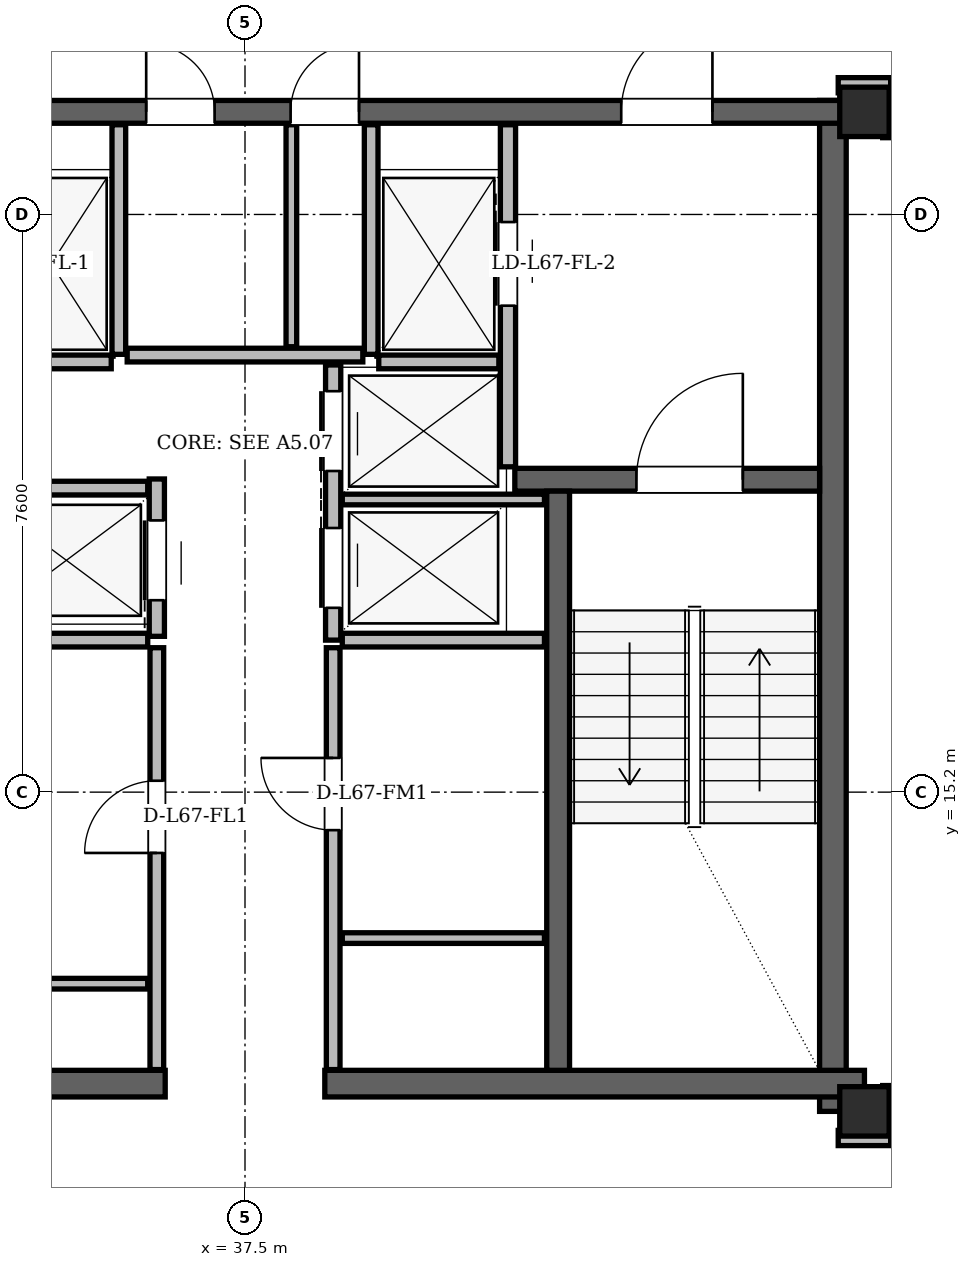
"""IFC4 building model, lengths in metres.
Left out: names, types, materials, properties, quantities, classifications, styles, units other than length and angle.
Written with IfcOpenShell. Run it as: python <this file> out.ifc"""

import sys

from ifc_helpers import new_model, si_unit, direction, frame, frame_2d, origin, origin_2d, place, context, subcontext, project, spatial, rectangle, hollow_rectangle, extrude, element, fill, save


model = new_model("IFC4")
c1 = context("Model", 3, precision=1e-05, world=origin(), true_north=direction((0.0, 1.0)))
c2 = subcontext(c1, "Body", "Model", "MODEL_VIEW")
j1 = project(units=[si_unit("LENGTHUNIT", "METRE"), si_unit("PLANEANGLEUNIT", "RADIAN")], contexts=[c1])
p1 = place(None, origin())
s1 = spatial("IfcSite", under=j1, at=p1, CompositionType="ELEMENT")
p2 = place(p1, origin())
s2 = spatial("IfcBuilding", under=s1, at=p2, CompositionType="ELEMENT")
p3 = place(p2, frame((0.0, 0.0, 253.8)))
s3 = spatial("IfcBuildingStorey", under=s2, at=p3, CompositionType="ELEMENT", Elevation=253.8)
for number, where, z_axis, x_axis in (
    (1, (45.65, 11.0, 0.0), (0.0, 0.0, 1.0), (1.0, 0.0, 0.0)),
    (2, (45.65, 24.15, 0.0), (0.0, 0.0, 1.0), (1.0, 0.0, 0.0)),
):
    element("IfcColumn", number, at=place(p3, frame(where, z_axis=z_axis, x_axis=x_axis)), inside=s3, PredefinedType="COLUMN", context=c2, shape_type="SweptSolid", body=[
        extrude(hollow_rectangle(XDim=0.65, YDim=0.65, WallThickness=0.05, at=origin_2d()), origin(), (0.0, 0.0, 1.0), 3.9),
    ])
p4 = place(p3, frame((45.235, 11.0, 0.0), z_axis=(0.0, 0.0, 1.0), x_axis=(0.0, 1.0, 0.0)))
e3 = element("IfcWall", 3, at=p4, inside=s3, PredefinedType="SHEAR", context=c2, shape_type="SweptSolid", body=[
    extrude(rectangle(XDim=13.3, YDim=0.35, at=frame_2d((6.65, 0.0))), origin(), (0.0, 0.0, 1.0), 3.68),
])
for number, where, z_axis, x_axis in (
    (4, (29.35, 11.365, 0.0), (0.0, 0.0, 1.0), (1.0, 0.0, 0.0)),
    (5, (38.55, 11.365, 0.0), (0.0, 0.0, 1.0), (1.0, 0.0, 0.0)),
):
    element("IfcWall", number, at=place(p3, frame(where, z_axis=z_axis, x_axis=x_axis)), inside=s3, PredefinedType="SHEAR", context=c2, shape_type="SweptSolid", body=[
        extrude(rectangle(XDim=7.1, YDim=0.35, at=frame_2d((3.55, 0.0))), origin(), (0.0, 0.0, 1.0), 3.68),
    ])
p5 = place(p3, frame((29.65, 24.15, 0.0), z_axis=(0.0, 0.0, 1.0), x_axis=(1.0, 0.0, 0.0)))
e6 = element("IfcWall", 6, at=p5, inside=s3, PredefinedType="SHEAR", context=c2, shape_type="SweptSolid", body=[
    extrude(rectangle(XDim=15.7, YDim=0.3, at=frame_2d((7.85, 0.0))), origin(), (0.0, 0.0, 1.0), 3.68),
])
p6 = place(p5, frame((1.7, 0.0, 0.0)))
e7 = element("IfcOpeningElement", 7, at=p6, cuts=e6, PredefinedType="OPENING", context=c2, shape_type="SweptSolid", body=[
    extrude(rectangle(XDim=1.2, YDim=2.2, at=frame_2d((0.6, 1.1))), frame((0.0, 0.15, 0.0), z_axis=(0.0, -1.0, 0.0), x_axis=(1.0, 0.0, 0.0)), (0.0, 0.0, 1.0), 0.3),
])
p7 = place(p5, frame((12.8, 0.0, 0.0)))
e8 = element("IfcOpeningElement", 8, at=p7, cuts=e6, PredefinedType="OPENING", context=c2, shape_type="SweptSolid", body=[
    extrude(rectangle(XDim=1.2, YDim=2.2, at=frame_2d((0.6, 1.1))), frame((0.0, 0.15, 0.0), z_axis=(0.0, -1.0, 0.0), x_axis=(1.0, 0.0, 0.0)), (0.0, 0.0, 1.0), 0.3),
])
p8 = place(p5, frame((6.55, 0.0, 0.0)))
e9 = element("IfcOpeningElement", 9, at=p8, cuts=e6, PredefinedType="OPENING", context=c2, shape_type="SweptSolid", body=[
    extrude(rectangle(XDim=0.9, YDim=2.05, at=frame_2d((0.45, 1.025))), frame((0.0, 0.15, 0.0), z_axis=(0.0, -1.0, 0.0), x_axis=(1.0, 0.0, 0.0)), (0.0, 0.0, 1.0), 0.3),
])
p9 = place(p5, frame((8.45, 0.0, 0.0)))
e10 = element("IfcOpeningElement", 10, at=p9, cuts=e6, PredefinedType="OPENING", context=c2, shape_type="SweptSolid", body=[
    extrude(rectangle(XDim=0.9, YDim=2.05, at=frame_2d((0.45, 1.025))), frame((0.0, 0.15, 0.0), z_axis=(0.0, -1.0, 0.0), x_axis=(1.0, 0.0, 0.0)), (0.0, 0.0, 1.0), 0.3),
])
p10 = place(p3, frame((41.05, 19.31, 0.0), z_axis=(0.0, 0.0, 1.0), x_axis=(1.0, 0.0, 0.0)))
e11 = element("IfcWall", 11, at=p10, inside=s3, PredefinedType="SHEAR", context=c2, shape_type="SweptSolid", body=[
    extrude(rectangle(XDim=4.01, YDim=0.3, at=frame_2d((2.005, 0.0))), origin(), (0.0, 0.0, 1.0), 3.68),
])
p11 = place(p10, frame((1.6, 0.0, 0.0)))
e12 = element("IfcOpeningElement", 12, at=p11, cuts=e11, PredefinedType="OPENING", context=c2, shape_type="SweptSolid", body=[
    extrude(rectangle(XDim=1.4, YDim=2.2, at=frame_2d((0.7, 1.1))), frame((0.0, 0.15, 0.0), z_axis=(0.0, -1.0, 0.0), x_axis=(1.0, 0.0, 0.0)), (0.0, 0.0, 1.0), 0.3),
])
p12 = place(p3, frame((41.62, 11.54, 0.0), z_axis=(0.0, 0.0, 1.0), x_axis=(0.0, 1.0, 0.0)))
e13 = element("IfcWall", 13, at=p12, inside=s3, PredefinedType="SHEAR", context=c2, shape_type="SweptSolid", body=[
    extrude(rectangle(XDim=7.62, YDim=0.3, at=frame_2d((3.81, 0.0))), origin(), (0.0, 0.0, 1.0), 3.68),
])
p13 = place(p3, frame((58.733, 10.938, 0.0), z_axis=(0.0, 0.0, 1.0), x_axis=(-0.500001745664, 0.866024395923, 0.0)))
e14 = element("IfcWall", 14, at=p13, inside=s3, PredefinedType="SOLIDWALL", context=c2, shape_type="SweptSolid", body=[
    extrude(rectangle(XDim=37.102, YDim=0.29, at=frame_2d((18.551, 0.0))), origin(), (0.0, 0.0, 1.0), 3.058),
])
p14 = place(p13, frame((8.034, 0.0, 0.0)))
e15 = element("IfcOpeningElement", 15, at=p14, cuts=e14, PredefinedType="OPENING", context=c2, shape_type="SweptSolid", body=[
    extrude(rectangle(XDim=1.5, YDim=2.2, at=frame_2d((0.75, 1.1))), frame((0.0, 0.145, 0.0), z_axis=(0.0, -1.0, 0.0), x_axis=(1.0, 0.0, 0.0)), (0.0, 0.0, 1.0), 0.29),
])
p15 = place(p13, frame((31.963, 0.0, 0.0)))
e16 = element("IfcOpeningElement", 16, at=p15, cuts=e14, PredefinedType="OPENING", context=c2, shape_type="SweptSolid", body=[
    extrude(rectangle(XDim=1.5, YDim=2.2, at=frame_2d((0.75, 1.1))), frame((0.0, 0.145, 0.0), z_axis=(0.0, -1.0, 0.0), x_axis=(1.0, 0.0, 0.0)), (0.0, 0.0, 1.0), 0.29),
])
p16 = place(p13, frame((12.245, 0.0, 0.85)))
e17 = element("IfcOpeningElement", 17, at=p16, cuts=e14, PredefinedType="OPENING", context=c2, shape_type="SweptSolid", body=[
    extrude(rectangle(XDim=2.6, YDim=1.95, at=frame_2d((1.3, 0.975))), frame((0.0, 0.145, 0.0), z_axis=(0.0, -1.0, 0.0), x_axis=(1.0, 0.0, 0.0)), (0.0, 0.0, 1.0), 0.29),
])
p17 = place(p13, frame((1.081, 0.0, 0.85)))
e18 = element("IfcOpeningElement", 18, at=p17, cuts=e14, PredefinedType="OPENING", context=c2, shape_type="SweptSolid", body=[
    extrude(rectangle(XDim=2.4, YDim=1.9, at=frame_2d((1.2, 0.95))), frame((0.0, 0.145, 0.0), z_axis=(0.0, -1.0, 0.0), x_axis=(1.0, 0.0, 0.0)), (0.0, 0.0, 1.0), 0.29),
])
p18 = place(p13, frame((28.842, 0.0, 0.85)))
e19 = element("IfcOpeningElement", 19, at=p18, cuts=e14, PredefinedType="OPENING", context=c2, shape_type="SweptSolid", body=[
    extrude(rectangle(XDim=1.2, YDim=1.48, at=frame_2d((0.6, 0.74))), frame((0.0, 0.145, 0.0), z_axis=(0.0, -1.0, 0.0), x_axis=(1.0, 0.0, 0.0)), (0.0, 0.0, 1.0), 0.29),
])
p19 = place(p13, frame((34.409, 0.0, 0.85)))
e20 = element("IfcOpeningElement", 20, at=p19, cuts=e14, PredefinedType="OPENING", context=c2, shape_type="SweptSolid", body=[
    extrude(rectangle(XDim=1.2, YDim=1.48, at=frame_2d((0.6, 0.74))), frame((0.0, 0.145, 0.0), z_axis=(0.0, -1.0, 0.0), x_axis=(1.0, 0.0, 0.0)), (0.0, 0.0, 1.0), 0.29),
])
p20 = place(p13, frame((15.882, 0.0, 0.85)))
e21 = element("IfcOpeningElement", 21, at=p20, cuts=e14, PredefinedType="OPENING", context=c2, shape_type="SweptSolid", body=[
    extrude(rectangle(XDim=1.2, YDim=1.48, at=frame_2d((0.6, 0.74))), frame((0.0, 0.145, 0.0), z_axis=(0.0, -1.0, 0.0), x_axis=(1.0, 0.0, 0.0)), (0.0, 0.0, 1.0), 0.29),
])
p21 = place(p13, frame((23.379, 0.0, 0.85)))
e22 = element("IfcOpeningElement", 22, at=p21, cuts=e14, PredefinedType="OPENING", context=c2, shape_type="SweptSolid", body=[
    extrude(rectangle(XDim=1.2, YDim=1.48, at=frame_2d((0.6, 0.74))), frame((0.0, 0.145, 0.0), z_axis=(0.0, -1.0, 0.0), x_axis=(1.0, 0.0, 0.0)), (0.0, 0.0, 1.0), 0.29),
])
p22 = place(p3, frame((35.84, 20.96, 0.0), z_axis=(0.0, 0.0, 1.0), x_axis=(0.0, 1.0, 0.0)))
e23 = element("IfcWall", 23, at=p22, inside=s3, PredefinedType="PARTITIONING", context=c2, shape_type="SweptSolid", body=[
    extrude(rectangle(XDim=3.02, YDim=0.18, at=frame_2d((1.51, 0.0))), origin(), (0.0, 0.0, 1.0), 3.68),
])
p23 = place(p3, frame((34.16, 20.86, 0.0), z_axis=(0.0, 0.0, 1.0), x_axis=(1.0, 0.0, 0.0)))
e24 = element("IfcWall", 24, at=p23, inside=s3, PredefinedType="PARTITIONING", context=c2, shape_type="SweptSolid", body=[
    extrude(rectangle(XDim=1.58, YDim=0.18, at=frame_2d((0.79, 0.0))), origin(), (0.0, 0.0, 1.0), 3.68),
])
p24 = place(p3, frame((40.96, 19.48, 0.0), z_axis=(0.0, 0.0, 1.0), x_axis=(0.0, 1.0, 0.0)))
e25 = element("IfcWall", 25, at=p24, inside=s3, PredefinedType="PARTITIONING", context=c2, shape_type="SweptSolid", body=[
    extrude(rectangle(XDim=4.5, YDim=0.2, at=frame_2d((2.25, 0.0))), origin(), (0.0, 0.0, 1.0), 3.68),
])
p25 = place(p24, frame((2.12, 0.0, 0.0)))
e26 = element("IfcOpeningElement", 26, at=p25, cuts=e25, PredefinedType="OPENING", context=c2, shape_type="SweptSolid", body=[
    extrude(rectangle(XDim=1.1, YDim=2.2, at=frame_2d((0.55, 1.1))), frame((0.0, 0.1, 0.0), z_axis=(0.0, -1.0, 0.0), x_axis=(1.0, 0.0, 0.0)), (0.0, 0.0, 1.0), 0.2),
])
p26 = place(p3, frame((39.16, 20.96, 0.0), z_axis=(0.0, 0.0, 1.0), x_axis=(0.0, 1.0, 0.0)))
e27 = element("IfcWall", 27, at=p26, inside=s3, PredefinedType="PARTITIONING", context=c2, shape_type="SweptSolid", body=[
    extrude(rectangle(XDim=3.02, YDim=0.18, at=frame_2d((1.51, 0.0))), origin(), (0.0, 0.0, 1.0), 3.68),
])
p27 = place(p3, frame((39.26, 20.86, 0.0), z_axis=(0.0, 0.0, 1.0), x_axis=(1.0, 0.0, 0.0)))
e28 = element("IfcWall", 28, at=p27, inside=s3, PredefinedType="PARTITIONING", context=c2, shape_type="SweptSolid", body=[
    extrude(rectangle(XDim=1.58, YDim=0.18, at=frame_2d((0.79, 0.0))), origin(), (0.0, 0.0, 1.0), 3.68),
])
p28 = place(p3, frame((36.34, 17.25, 0.0), z_axis=(0.0, 0.0, 1.0), x_axis=(0.0, 1.0, 0.0)))
e29 = element("IfcWall", 29, at=p28, inside=s3, PredefinedType="PARTITIONING", context=c2, shape_type="SweptSolid", body=[
    extrude(rectangle(XDim=2.07, YDim=0.2, at=frame_2d((1.035, 0.0))), origin(), (0.0, 0.0, 1.0), 3.68),
])
p29 = place(p28, frame((0.475, 0.0, 0.0)))
e30 = element("IfcOpeningElement", 30, at=p29, cuts=e29, PredefinedType="OPENING", context=c2, shape_type="SweptSolid", body=[
    extrude(rectangle(XDim=1.05, YDim=2.15, at=frame_2d((0.525, 1.075))), frame((0.0, 0.1, 0.0), z_axis=(0.0, -1.0, 0.0), x_axis=(1.0, 0.0, 0.0)), (0.0, 0.0, 1.0), 0.2),
])
p30 = place(p3, frame((33.95, 19.2, 0.0), z_axis=(0.0, 0.0, 1.0), x_axis=(1.0, 0.0, 0.0)))
e31 = element("IfcWall", 31, at=p30, inside=s3, PredefinedType="PARTITIONING", context=c2, shape_type="SweptSolid", body=[
    extrude(rectangle(XDim=2.27, YDim=0.18, at=frame_2d((1.135, 0.0))), origin(), (0.0, 0.0, 1.0), 3.68),
])
p31 = place(p3, frame((33.56, 17.2, 0.0), z_axis=(0.0, 0.0, 1.0), x_axis=(1.0, 0.0, 0.0)))
e32 = element("IfcWall", 32, at=p31, inside=s3, PredefinedType="PARTITIONING", context=c2, shape_type="SweptSolid", body=[
    extrude(rectangle(XDim=2.66, YDim=0.18, at=frame_2d((1.33, 0.0))), origin(), (0.0, 0.0, 1.0), 3.68),
])
p32 = place(p3, frame((36.34, 11.55, 0.0), z_axis=(0.0, 0.0, 1.0), x_axis=(0.0, 1.0, 0.0)))
e33 = element("IfcWall", 33, at=p32, inside=s3, PredefinedType="PARTITIONING", context=c2, shape_type="SweptSolid", body=[
    extrude(rectangle(XDim=5.55, YDim=0.18, at=frame_2d((2.775, 0.0))), origin(), (0.0, 0.0, 1.0), 3.68),
])
p33 = place(p32, frame((2.85, 0.0, 0.0)))
e34 = element("IfcOpeningElement", 34, at=p33, cuts=e33, PredefinedType="OPENING", context=c2, shape_type="SweptSolid", body=[
    extrude(rectangle(XDim=0.95, YDim=2.1, at=frame_2d((0.475, 1.05))), frame((0.0, 0.09, 0.0), z_axis=(0.0, -1.0, 0.0), x_axis=(1.0, 0.0, 0.0)), (0.0, 0.0, 1.0), 0.18),
])
p34 = place(p3, frame((33.56, 12.68, 0.0), z_axis=(0.0, 0.0, 1.0), x_axis=(1.0, 0.0, 0.0)))
e35 = element("IfcWall", 35, at=p34, inside=s3, PredefinedType="PARTITIONING", context=c2, shape_type="SweptSolid", body=[
    extrude(rectangle(XDim=2.66, YDim=0.14, at=frame_2d((1.33, 0.0))), origin(), (0.0, 0.0, 1.0), 3.68),
])
p35 = place(p3, frame((38.66, 17.2, 0.0), z_axis=(0.0, 0.0, 1.0), x_axis=(0.0, 1.0, 0.0)))
e36 = element("IfcWall", 36, at=p35, inside=s3, PredefinedType="PARTITIONING", context=c2, shape_type="SweptSolid", body=[
    extrude(rectangle(XDim=3.62, YDim=0.2, at=frame_2d((1.81, 0.0))), origin(), (0.0, 0.0, 1.0), 3.68),
])
p36 = place(p35, frame((0.425, 0.0, 0.0)))
e37 = element("IfcOpeningElement", 37, at=p36, cuts=e36, PredefinedType="OPENING", context=c2, shape_type="SweptSolid", body=[
    extrude(rectangle(XDim=1.05, YDim=2.15, at=frame_2d((0.525, 1.075))), frame((0.0, 0.1, 0.0), z_axis=(0.0, -1.0, 0.0), x_axis=(1.0, 0.0, 0.0)), (0.0, 0.0, 1.0), 0.2),
])
p37 = place(p35, frame((2.225, 0.0, 0.0)))
e38 = element("IfcOpeningElement", 38, at=p37, cuts=e36, PredefinedType="OPENING", context=c2, shape_type="SweptSolid", body=[
    extrude(rectangle(XDim=1.05, YDim=2.15, at=frame_2d((0.525, 1.075))), frame((0.0, 0.1, 0.0), z_axis=(0.0, -1.0, 0.0), x_axis=(1.0, 0.0, 0.0)), (0.0, 0.0, 1.0), 0.2),
])
p38 = place(p3, frame((38.78, 17.2, 0.0), z_axis=(0.0, 0.0, 1.0), x_axis=(1.0, 0.0, 0.0)))
e39 = element("IfcWall", 39, at=p38, inside=s3, PredefinedType="PARTITIONING", context=c2, shape_type="SweptSolid", body=[
    extrude(rectangle(XDim=2.66, YDim=0.18, at=frame_2d((1.33, 0.0))), origin(), (0.0, 0.0, 1.0), 3.68),
])
p39 = place(p3, frame((38.78, 19.05, 0.0), z_axis=(0.0, 0.0, 1.0), x_axis=(1.0, 0.0, 0.0)))
e40 = element("IfcWall", 40, at=p39, inside=s3, PredefinedType="PARTITIONING", context=c2, shape_type="SweptSolid", body=[
    extrude(rectangle(XDim=2.66, YDim=0.14, at=frame_2d((1.33, 0.0))), origin(), (0.0, 0.0, 1.0), 3.68),
])
p40 = place(p3, frame((38.66, 11.55, 0.0), z_axis=(0.0, 0.0, 1.0), x_axis=(0.0, 1.0, 0.0)))
e41 = element("IfcWall", 41, at=p40, inside=s3, PredefinedType="PARTITIONING", context=c2, shape_type="SweptSolid", body=[
    extrude(rectangle(XDim=5.55, YDim=0.18, at=frame_2d((2.775, 0.0))), origin(), (0.0, 0.0, 1.0), 3.68),
])
p41 = place(p40, frame((3.15, 0.0, 0.0)))
e42 = element("IfcOpeningElement", 42, at=p41, cuts=e41, PredefinedType="OPENING", context=c2, shape_type="SweptSolid", body=[
    extrude(rectangle(XDim=0.95, YDim=2.1, at=frame_2d((0.475, 1.05))), frame((0.0, 0.09, 0.0), z_axis=(0.0, -1.0, 0.0), x_axis=(1.0, 0.0, 0.0)), (0.0, 0.0, 1.0), 0.18),
])
p42 = place(p3, frame((38.78, 13.28, 0.0), z_axis=(0.0, 0.0, 1.0), x_axis=(1.0, 0.0, 0.0)))
e43 = element("IfcWall", 43, at=p42, inside=s3, PredefinedType="PARTITIONING", context=c2, shape_type="SweptSolid", body=[
    extrude(rectangle(XDim=2.66, YDim=0.14, at=frame_2d((1.33, 0.0))), origin(), (0.0, 0.0, 1.0), 3.68),
])
p43 = place(p3, frame((35.95, 20.95, 0.0), z_axis=(0.0, 0.0, 1.0), x_axis=(1.0, 0.0, 0.0)))
e44 = element("IfcWall", 44, at=p43, inside=s3, PredefinedType="PARTITIONING", context=c2, shape_type="SweptSolid", body=[
    extrude(rectangle(XDim=3.1, YDim=0.18, at=frame_2d((1.55, 0.0))), origin(), (0.0, 0.0, 1.0), 3.68),
])
p44 = place(p3, frame((38.11, 21.06, 0.0), z_axis=(0.0, 0.0, 1.0), x_axis=(0.0, 1.0, 0.0)))
e45 = element("IfcWall", 45, at=p44, inside=s3, PredefinedType="PARTITIONING", context=c2, shape_type="SweptSolid", body=[
    extrude(rectangle(XDim=2.92, YDim=0.14, at=frame_2d((1.46, 0.0))), origin(), (0.0, 0.0, 1.0), 3.68),
])
p45 = place(p3, frame((45.305, 10.65, 0.0), z_axis=(0.0, 0.0, 1.0), x_axis=(1.0, 0.0, 0.0)))
e46 = element("IfcWall", 46, at=p45, inside=s3, PredefinedType="PARTITIONING", context=c2, shape_type="SweptSolid", body=[
    extrude(rectangle(XDim=0.69, YDim=0.2, at=frame_2d((0.345, 0.0))), origin(), (0.0, 0.0, 1.0), 3.68),
])
p46 = place(p3, frame((45.305, 24.5, 0.0), z_axis=(0.0, 0.0, 1.0), x_axis=(1.0, 0.0, 0.0)))
e47 = element("IfcWall", 47, at=p46, inside=s3, PredefinedType="PARTITIONING", context=c2, shape_type="SweptSolid", body=[
    extrude(rectangle(XDim=0.69, YDim=0.2, at=frame_2d((0.345, 0.0))), origin(), (0.0, 0.0, 1.0), 3.266),
])
p47 = place(p3, frame((45.99, 10.95, 0.0), z_axis=(0.0, 0.0, 1.0), x_axis=(0.0, 1.0, 0.0)))
e48 = element("IfcWall", 48, at=p47, inside=s3, PredefinedType="PARTITIONING", context=c2, shape_type="SweptSolid", body=[
    extrude(rectangle(XDim=0.39, YDim=0.2, at=frame_2d((0.195, 0.0))), origin(), (0.0, 0.0, 1.0), 3.266),
])
p48 = place(p3, frame((45.99, 23.81, 0.0), z_axis=(0.0, 0.0, 1.0), x_axis=(0.0, 1.0, 0.0)))
e49 = element("IfcWall", 49, at=p48, inside=s3, PredefinedType="PARTITIONING", context=c2, shape_type="SweptSolid", body=[
    extrude(rectangle(XDim=0.51, YDim=0.2, at=frame_2d((0.255, 0.0))), origin(), (0.0, 0.0, 1.0), 3.68),
])
p49 = place(p33, origin())
e50 = element("IfcDoor", 50, at=p49, inside=s3, OperationType="SINGLE_SWING_LEFT", PredefinedType="DOOR", context=c2, shape_type="SweptSolid", body=[
    extrude(rectangle(XDim=0.95, YDim=2.1, at=frame_2d((0.475, 1.05))), frame((0.0, 0.025, 0.0), z_axis=(0.0, -1.0, 0.0), x_axis=(1.0, 0.0, 0.0)), (0.0, 0.0, 1.0), 0.05),
])
fill(e34, e50)
p50 = place(p41, origin())
e51 = element("IfcDoor", 51, at=p50, inside=s3, OperationType="SINGLE_SWING_RIGHT", PredefinedType="DOOR", context=c2, shape_type="SweptSolid", body=[
    extrude(rectangle(XDim=0.95, YDim=2.1, at=frame_2d((0.475, 1.05))), frame((0.0, 0.025, 0.0), z_axis=(0.0, -1.0, 0.0), x_axis=(1.0, 0.0, 0.0)), (0.0, 0.0, 1.0), 0.05),
])
fill(e42, e51)
p51 = place(p25, origin())
e52 = element("IfcDoor", 52, at=p51, inside=s3, OperationType="SLIDING_TO_RIGHT", PredefinedType="DOOR", context=c2, shape_type="SweptSolid", body=[
    extrude(rectangle(XDim=1.1, YDim=2.2, at=frame_2d((0.55, 1.1))), frame((0.0, 0.025, 0.0), z_axis=(0.0, -1.0, 0.0), x_axis=(1.0, 0.0, 0.0)), (0.0, 0.0, 1.0), 0.05),
])
fill(e26, e52)
p52 = place(p29, origin())
e53 = element("IfcDoor", 53, at=p52, inside=s3, OperationType="SLIDING_TO_LEFT", PredefinedType="DOOR", context=c2, shape_type="SweptSolid", body=[
    extrude(rectangle(XDim=1.05, YDim=2.15, at=frame_2d((0.525, 1.075))), frame((0.0, 0.025, 0.0), z_axis=(0.0, -1.0, 0.0), x_axis=(1.0, 0.0, 0.0)), (0.0, 0.0, 1.0), 0.05),
])
fill(e30, e53)
p53 = place(p36, origin())
e54 = element("IfcDoor", 54, at=p53, inside=s3, OperationType="SLIDING_TO_RIGHT", PredefinedType="DOOR", context=c2, shape_type="SweptSolid", body=[
    extrude(rectangle(XDim=1.05, YDim=2.15, at=frame_2d((0.525, 1.075))), frame((0.0, 0.025, 0.0), z_axis=(0.0, -1.0, 0.0), x_axis=(1.0, 0.0, 0.0)), (0.0, 0.0, 1.0), 0.05),
])
fill(e37, e54)
p54 = place(p37, origin())
e55 = element("IfcDoor", 55, at=p54, inside=s3, OperationType="SLIDING_TO_LEFT", PredefinedType="DOOR", context=c2, shape_type="SweptSolid", body=[
    extrude(rectangle(XDim=1.05, YDim=2.15, at=frame_2d((0.525, 1.075))), frame((0.0, 0.025, 0.0), z_axis=(0.0, -1.0, 0.0), x_axis=(1.0, 0.0, 0.0)), (0.0, 0.0, 1.0), 0.05),
])
fill(e38, e55)
p55 = place(p11, origin())
e56 = element("IfcDoor", 56, at=p55, inside=s3, OperationType="SINGLE_SWING_RIGHT", PredefinedType="DOOR", context=c2, shape_type="SweptSolid", body=[
    extrude(rectangle(XDim=1.4, YDim=2.2, at=frame_2d((0.7, 1.1))), frame((0.0, 0.025, 0.0), z_axis=(0.0, -1.0, 0.0), x_axis=(1.0, 0.0, 0.0)), (0.0, 0.0, 1.0), 0.05),
])
fill(e12, e56)
p56 = place(p7, origin())
e57 = element("IfcDoor", 57, at=p56, inside=s3, OperationType="SINGLE_SWING_RIGHT", PredefinedType="DOOR", context=c2, shape_type="SweptSolid", body=[
    extrude(rectangle(XDim=1.2, YDim=2.2, at=frame_2d((0.6, 1.1))), frame((0.0, 0.025, 0.0), z_axis=(0.0, -1.0, 0.0), x_axis=(1.0, 0.0, 0.0)), (0.0, 0.0, 1.0), 0.05),
])
fill(e8, e57)
p57 = place(p8, origin())
e58 = element("IfcDoor", 58, at=p57, inside=s3, OperationType="SINGLE_SWING_LEFT", PredefinedType="DOOR", context=c2, shape_type="SweptSolid", body=[
    extrude(rectangle(XDim=0.9, YDim=2.05, at=frame_2d((0.45, 1.025))), frame((0.0, 0.025, 0.0), z_axis=(0.0, -1.0, 0.0), x_axis=(1.0, 0.0, 0.0)), (0.0, 0.0, 1.0), 0.05),
])
fill(e9, e58)
p58 = place(p9, origin())
e59 = element("IfcDoor", 59, at=p58, inside=s3, OperationType="SINGLE_SWING_RIGHT", PredefinedType="DOOR", context=c2, shape_type="SweptSolid", body=[
    extrude(rectangle(XDim=0.9, YDim=2.05, at=frame_2d((0.45, 1.025))), frame((0.0, 0.025, 0.0), z_axis=(0.0, -1.0, 0.0), x_axis=(1.0, 0.0, 0.0)), (0.0, 0.0, 1.0), 0.05),
])
fill(e10, e59)
save(model, sys.argv[1])
